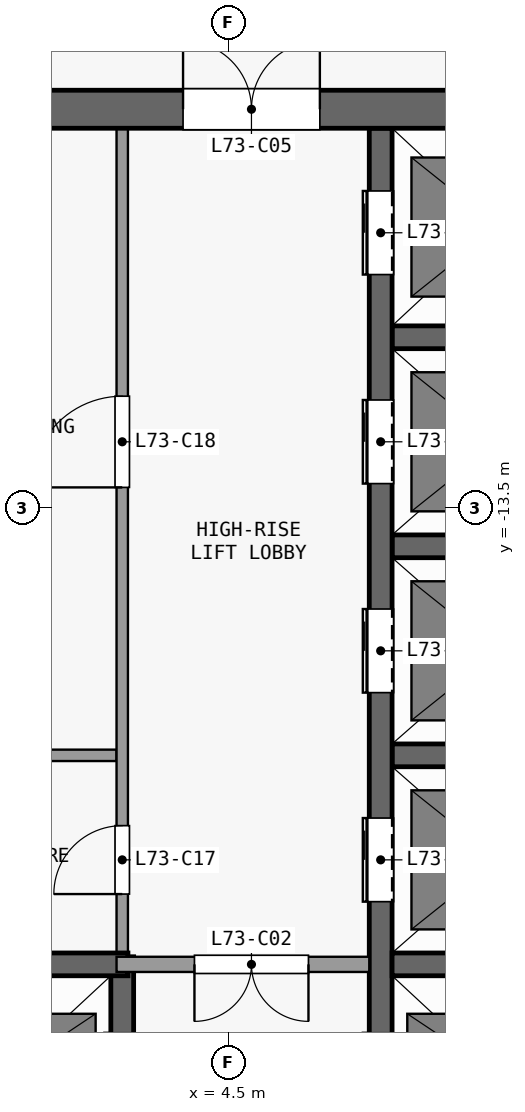
"""IFC4 building model, lengths in metres.
Left out: names, types, materials, properties, quantities, classifications, styles, units other than length and angle.
Written with IfcOpenShell. Run it as: python <this file> out.ifc"""

import sys

from ifc_helpers import new_model, si_unit, direction, frame, frame_2d, origin, place, context, subcontext, project, spatial, rectangle, extrude, element, fill, save


model = new_model("IFC4")
c1 = context("Model", 3, precision=1e-05, world=origin(), true_north=direction((0.0, 1.0)))
c2 = subcontext(c1, "Body", "Model", "MODEL_VIEW")
j1 = project(units=[si_unit("LENGTHUNIT", "METRE"), si_unit("PLANEANGLEUNIT", "RADIAN")], contexts=[c1])
p1 = place(None, origin())
s1 = spatial("IfcSite", under=j1, at=p1, CompositionType="ELEMENT")
p2 = place(p1, origin())
s2 = spatial("IfcBuilding", under=s1, at=p2, CompositionType="ELEMENT")
p3 = place(p2, frame((0.0, 0.0, 287.9)))
s3 = spatial("IfcBuildingStorey", under=s2, at=p3, CompositionType="ELEMENT", Elevation=287.9)
p4 = place(p3, frame((-13.1, -8.25, 0.0), z_axis=(0.0, 0.0, 1.0), x_axis=(1.0, 0.0, 0.0)))
e1 = element("IfcWall", 1, at=p4, inside=s3, PredefinedType="SHEAR", context=c2, shape_type="SweptSolid", body=[
    extrude(rectangle(XDim=26.2, YDim=0.5, at=frame_2d((13.1, 0.0))), origin(), (0.0, 0.0, 1.0), 3.3),
])
p5 = place(p4, frame((7.4, 0.0, 0.0)))
e2 = element("IfcOpeningElement", 2, at=p5, cuts=e1, PredefinedType="OPENING", context=c2, shape_type="SweptSolid", body=[
    extrude(rectangle(XDim=1.8, YDim=2.1, at=frame_2d((0.9, 1.05))), frame((0.0, 0.26, 0.0), z_axis=(0.0, -1.0, 0.0), x_axis=(1.0, 0.0, 0.0)), (0.0, 0.0, 1.0), 0.52),
])
p6 = place(p4, frame((17.0, 0.0, 0.0)))
e3 = element("IfcOpeningElement", 3, at=p6, cuts=e1, PredefinedType="OPENING", context=c2, shape_type="SweptSolid", body=[
    extrude(rectangle(XDim=1.8, YDim=2.1, at=frame_2d((0.9, 1.05))), frame((0.0, 0.26, 0.0), z_axis=(0.0, -1.0, 0.0), x_axis=(1.0, 0.0, 0.0)), (0.0, 0.0, 1.0), 0.52),
])
p7 = place(p4, frame((2.325, 0.0, 0.0)))
e4 = element("IfcOpeningElement", 4, at=p7, cuts=e1, PredefinedType="OPENING", context=c2, shape_type="SweptSolid", body=[
    extrude(rectangle(XDim=0.9, YDim=2.1, at=frame_2d((0.45, 1.05))), frame((0.0, 0.26, 0.0), z_axis=(0.0, -1.0, 0.0), x_axis=(1.0, 0.0, 0.0)), (0.0, 0.0, 1.0), 0.52),
])
p8 = place(p4, frame((22.975, 0.0, 0.0)))
e5 = element("IfcOpeningElement", 5, at=p8, cuts=e1, PredefinedType="OPENING", context=c2, shape_type="SweptSolid", body=[
    extrude(rectangle(XDim=0.9, YDim=2.1, at=frame_2d((0.45, 1.05))), frame((0.0, 0.26, 0.0), z_axis=(0.0, -1.0, 0.0), x_axis=(1.0, 0.0, 0.0)), (0.0, 0.0, 1.0), 0.52),
])
p9 = place(p3, frame((-0.1, -19.5, 0.0), z_axis=(0.0, 0.0, 1.0), x_axis=(1.0, 0.0, 0.0)))
e6 = element("IfcWall", 6, at=p9, inside=s3, PredefinedType="SHEAR", context=c2, shape_type="SweptSolid", body=[
    extrude(rectangle(XDim=3.275, YDim=0.3, at=frame_2d((1.638, 0.0))), origin(), (0.0, 0.0, 1.0), 3.3),
])
p10 = place(p3, frame((6.35, -19.5, 0.0), z_axis=(0.0, 0.0, 1.0), x_axis=(-1.0, 0.0, 0.0)))
e7 = element("IfcWall", 7, at=p10, inside=s3, PredefinedType="PARTITIONING", context=c2, shape_type="SweptSolid", body=[
    extrude(rectangle(XDim=3.325, YDim=0.2, at=frame_2d((1.663, 0.0))), origin(), (0.0, 0.0, 1.0), 3.3),
])
p11 = place(p10, frame((0.8, 0.0, 0.0)))
e8 = element("IfcOpeningElement", 8, at=p11, cuts=e7, PredefinedType="OPENING", context=c2, shape_type="SweptSolid", body=[
    extrude(rectangle(XDim=1.5, YDim=2.1, at=frame_2d((0.75, 1.05))), frame((0.0, 0.11, 0.0), z_axis=(0.0, -1.0, 0.0), x_axis=(1.0, 0.0, 0.0)), (0.0, 0.0, 1.0), 0.22),
])
p12 = place(p3, frame((6.65, -19.5, 0.0), z_axis=(0.0, 0.0, 1.0), x_axis=(1.0, 0.0, 0.0)))
e9 = element("IfcWall", 9, at=p12, inside=s3, PredefinedType="SHEAR", context=c2, shape_type="SweptSolid", body=[
    extrude(rectangle(XDim=2.8, YDim=0.3, at=frame_2d((1.4, 0.0))), origin(), (0.0, 0.0, 1.0), 3.3),
])
p13 = place(p3, frame((0.1, -16.75, 0.0), z_axis=(0.0, 0.0, 1.0), x_axis=(1.0, 0.0, 0.0)))
e10 = element("IfcWall", 10, at=p13, inside=s3, PredefinedType="PARTITIONING", context=c2, shape_type="SweptSolid", body=[
    extrude(rectangle(XDim=2.925, YDim=0.15, at=frame_2d((1.462, 0.0))), origin(), (0.0, 0.0, 1.0), 3.3),
])
for number, where, z_axis, x_axis in (
    (11, (6.65, -16.75, 0.0), (0.0, 0.0, 1.0), (1.0, 0.0, 0.0)),
    (12, (6.65, -14.0, 0.0), (0.0, 0.0, 1.0), (1.0, 0.0, 0.0)),
    (13, (6.65, -11.25, 0.0), (0.0, 0.0, 1.0), (1.0, 0.0, 0.0)),
):
    element("IfcWall", number, at=place(p3, frame(where, z_axis=z_axis, x_axis=x_axis)), inside=s3, PredefinedType="SHEAR", context=c2, shape_type="SweptSolid", body=[
        extrude(rectangle(XDim=2.8, YDim=0.3, at=frame_2d((1.4, 0.0))), origin(), (0.0, 0.0, 1.0), 3.3),
    ])
p14 = place(p3, frame((3.1, -22.25, 0.0), z_axis=(0.0, 0.0, 1.0), x_axis=(0.0, 1.0, 0.0)))
e14 = element("IfcWall", 14, at=p14, inside=s3, PredefinedType="SHEAR", context=c2, shape_type="SweptSolid", body=[
    extrude(rectangle(XDim=2.85, YDim=0.3, at=frame_2d((1.425, 0.0))), origin(), (0.0, 0.0, 1.0), 3.3),
])
p15 = place(p14, frame((0.75, 0.0, 0.0)))
e15 = element("IfcOpeningElement", 15, at=p15, cuts=e14, PredefinedType="OPENING", context=c2, shape_type="SweptSolid", body=[
    extrude(rectangle(XDim=1.1, YDim=2.1, at=frame_2d((0.55, 1.05))), frame((0.0, 0.16, 0.0), z_axis=(0.0, -1.0, 0.0), x_axis=(1.0, 0.0, 0.0)), (0.0, 0.0, 1.0), 0.32),
])
p16 = place(p3, frame((3.1, -19.4, 0.0), z_axis=(0.0, 0.0, 1.0), x_axis=(0.0, 1.0, 0.0)))
e16 = element("IfcWall", 16, at=p16, inside=s3, PredefinedType="PARTITIONING", context=c2, shape_type="SweptSolid", body=[
    extrude(rectangle(XDim=10.9, YDim=0.15, at=frame_2d((5.45, 0.0))), origin(), (0.0, 0.0, 1.0), 3.3),
])
p17 = place(p16, frame((0.825, 0.0, 0.0)))
e17 = element("IfcOpeningElement", 17, at=p17, cuts=e16, PredefinedType="OPENING", context=c2, shape_type="SweptSolid", body=[
    extrude(rectangle(XDim=0.9, YDim=2.1, at=frame_2d((0.45, 1.05))), frame((0.0, 0.085, 0.0), z_axis=(0.0, -1.0, 0.0), x_axis=(1.0, 0.0, 0.0)), (0.0, 0.0, 1.0), 0.17),
])
p18 = place(p16, frame((6.175, 0.0, 0.0)))
e18 = element("IfcOpeningElement", 18, at=p18, cuts=e16, PredefinedType="OPENING", context=c2, shape_type="SweptSolid", body=[
    extrude(rectangle(XDim=1.2, YDim=2.1, at=frame_2d((0.6, 1.05))), frame((0.0, 0.085, 0.0), z_axis=(0.0, -1.0, 0.0), x_axis=(1.0, 0.0, 0.0)), (0.0, 0.0, 1.0), 0.17),
])
p19 = place(p3, frame((6.5, -22.55, 0.0), z_axis=(0.0, 0.0, 1.0), x_axis=(0.0, 1.0, 0.0)))
e19 = element("IfcWall", 19, at=p19, inside=s3, PredefinedType="SHEAR", context=c2, shape_type="SweptSolid", body=[
    extrude(rectangle(XDim=14.05, YDim=0.3, at=frame_2d((7.025, 0.0))), origin(), (0.0, 0.0, 1.0), 3.3),
])
p20 = place(p19, frame((1.05, 0.0, 0.0)))
e20 = element("IfcOpeningElement", 20, at=p20, cuts=e19, PredefinedType="OPENING", context=c2, shape_type="SweptSolid", body=[
    extrude(rectangle(XDim=1.1, YDim=2.1, at=frame_2d((0.55, 1.05))), frame((0.0, 0.16, 0.0), z_axis=(0.0, -1.0, 0.0), x_axis=(1.0, 0.0, 0.0)), (0.0, 0.0, 1.0), 0.32),
])
p21 = place(p19, frame((3.875, 0.0, 0.0)))
e21 = element("IfcOpeningElement", 21, at=p21, cuts=e19, PredefinedType="OPENING", context=c2, shape_type="SweptSolid", body=[
    extrude(rectangle(XDim=1.1, YDim=2.1, at=frame_2d((0.55, 1.05))), frame((0.0, 0.16, 0.0), z_axis=(0.0, -1.0, 0.0), x_axis=(1.0, 0.0, 0.0)), (0.0, 0.0, 1.0), 0.32),
])
p22 = place(p19, frame((6.625, 0.0, 0.0)))
e22 = element("IfcOpeningElement", 22, at=p22, cuts=e19, PredefinedType="OPENING", context=c2, shape_type="SweptSolid", body=[
    extrude(rectangle(XDim=1.1, YDim=2.1, at=frame_2d((0.55, 1.05))), frame((0.0, 0.16, 0.0), z_axis=(0.0, -1.0, 0.0), x_axis=(1.0, 0.0, 0.0)), (0.0, 0.0, 1.0), 0.32),
])
p23 = place(p19, frame((9.375, 0.0, 0.0)))
e23 = element("IfcOpeningElement", 23, at=p23, cuts=e19, PredefinedType="OPENING", context=c2, shape_type="SweptSolid", body=[
    extrude(rectangle(XDim=1.1, YDim=2.1, at=frame_2d((0.55, 1.05))), frame((0.0, 0.16, 0.0), z_axis=(0.0, -1.0, 0.0), x_axis=(1.0, 0.0, 0.0)), (0.0, 0.0, 1.0), 0.32),
])
p24 = place(p19, frame((12.125, 0.0, 0.0)))
e24 = element("IfcOpeningElement", 24, at=p24, cuts=e19, PredefinedType="OPENING", context=c2, shape_type="SweptSolid", body=[
    extrude(rectangle(XDim=1.1, YDim=2.1, at=frame_2d((0.55, 1.05))), frame((0.0, 0.16, 0.0), z_axis=(0.0, -1.0, 0.0), x_axis=(1.0, 0.0, 0.0)), (0.0, 0.0, 1.0), 0.32),
])
p25 = place(p21, origin())
e25 = element("IfcDoor", 25, at=p25, inside=s3, OperationType="DOUBLE_DOOR_SLIDING", PredefinedType="DOOR", context=c2, shape_type="SweptSolid", body=[
    extrude(rectangle(XDim=1.1, YDim=2.1, at=frame_2d((0.55, 1.05))), frame((0.0, 0.025, 0.0), z_axis=(0.0, -1.0, 0.0), x_axis=(1.0, 0.0, 0.0)), (0.0, 0.0, 1.0), 0.05),
])
fill(e21, e25)
p26 = place(p22, origin())
e26 = element("IfcDoor", 26, at=p26, inside=s3, OperationType="DOUBLE_DOOR_SLIDING", PredefinedType="DOOR", context=c2, shape_type="SweptSolid", body=[
    extrude(rectangle(XDim=1.1, YDim=2.1, at=frame_2d((0.55, 1.05))), frame((0.0, 0.025, 0.0), z_axis=(0.0, -1.0, 0.0), x_axis=(1.0, 0.0, 0.0)), (0.0, 0.0, 1.0), 0.05),
])
fill(e22, e26)
p27 = place(p23, origin())
e27 = element("IfcDoor", 27, at=p27, inside=s3, OperationType="DOUBLE_DOOR_SLIDING", PredefinedType="DOOR", context=c2, shape_type="SweptSolid", body=[
    extrude(rectangle(XDim=1.1, YDim=2.1, at=frame_2d((0.55, 1.05))), frame((0.0, 0.025, 0.0), z_axis=(0.0, -1.0, 0.0), x_axis=(1.0, 0.0, 0.0)), (0.0, 0.0, 1.0), 0.05),
])
fill(e23, e27)
p28 = place(p24, origin())
e28 = element("IfcDoor", 28, at=p28, inside=s3, OperationType="DOUBLE_DOOR_SLIDING", PredefinedType="DOOR", context=c2, shape_type="SweptSolid", body=[
    extrude(rectangle(XDim=1.1, YDim=2.1, at=frame_2d((0.55, 1.05))), frame((0.0, 0.025, 0.0), z_axis=(0.0, -1.0, 0.0), x_axis=(1.0, 0.0, 0.0)), (0.0, 0.0, 1.0), 0.05),
])
fill(e24, e28)
p29 = place(p11, origin())
e29 = element("IfcDoor", 29, at=p29, inside=s3, OperationType="DOUBLE_DOOR_SINGLE_SWING", PredefinedType="DOOR", context=c2, shape_type="SweptSolid", body=[
    extrude(rectangle(XDim=1.5, YDim=2.1, at=frame_2d((0.75, 1.05))), frame((0.0, 0.025, 0.0), z_axis=(0.0, -1.0, 0.0), x_axis=(1.0, 0.0, 0.0)), (0.0, 0.0, 1.0), 0.05),
])
fill(e8, e29)
p30 = place(p6, origin())
e30 = element("IfcDoor", 30, at=p30, inside=s3, OperationType="DOUBLE_DOOR_SINGLE_SWING", PredefinedType="DOOR", context=c2, shape_type="SweptSolid", body=[
    extrude(rectangle(XDim=1.8, YDim=2.1, at=frame_2d((0.9, 1.05))), frame((0.0, 0.025, 0.0), z_axis=(0.0, -1.0, 0.0), x_axis=(1.0, 0.0, 0.0)), (0.0, 0.0, 1.0), 0.05),
])
fill(e3, e30)
p31 = place(p17, origin())
e31 = element("IfcDoor", 31, at=p31, inside=s3, OperationType="SINGLE_SWING_LEFT", PredefinedType="DOOR", context=c2, shape_type="SweptSolid", body=[
    extrude(rectangle(XDim=0.9, YDim=2.1, at=frame_2d((0.45, 1.05))), frame((0.0, 0.025, 0.0), z_axis=(0.0, -1.0, 0.0), x_axis=(1.0, 0.0, 0.0)), (0.0, 0.0, 1.0), 0.05),
])
fill(e17, e31)
p32 = place(p18, origin())
e32 = element("IfcDoor", 32, at=p32, inside=s3, OperationType="SINGLE_SWING_LEFT", PredefinedType="DOOR", context=c2, shape_type="SweptSolid", body=[
    extrude(rectangle(XDim=1.2, YDim=2.1, at=frame_2d((0.6, 1.05))), frame((0.0, 0.025, 0.0), z_axis=(0.0, -1.0, 0.0), x_axis=(1.0, 0.0, 0.0)), (0.0, 0.0, 1.0), 0.05),
])
fill(e18, e32)
save(model, sys.argv[1])
